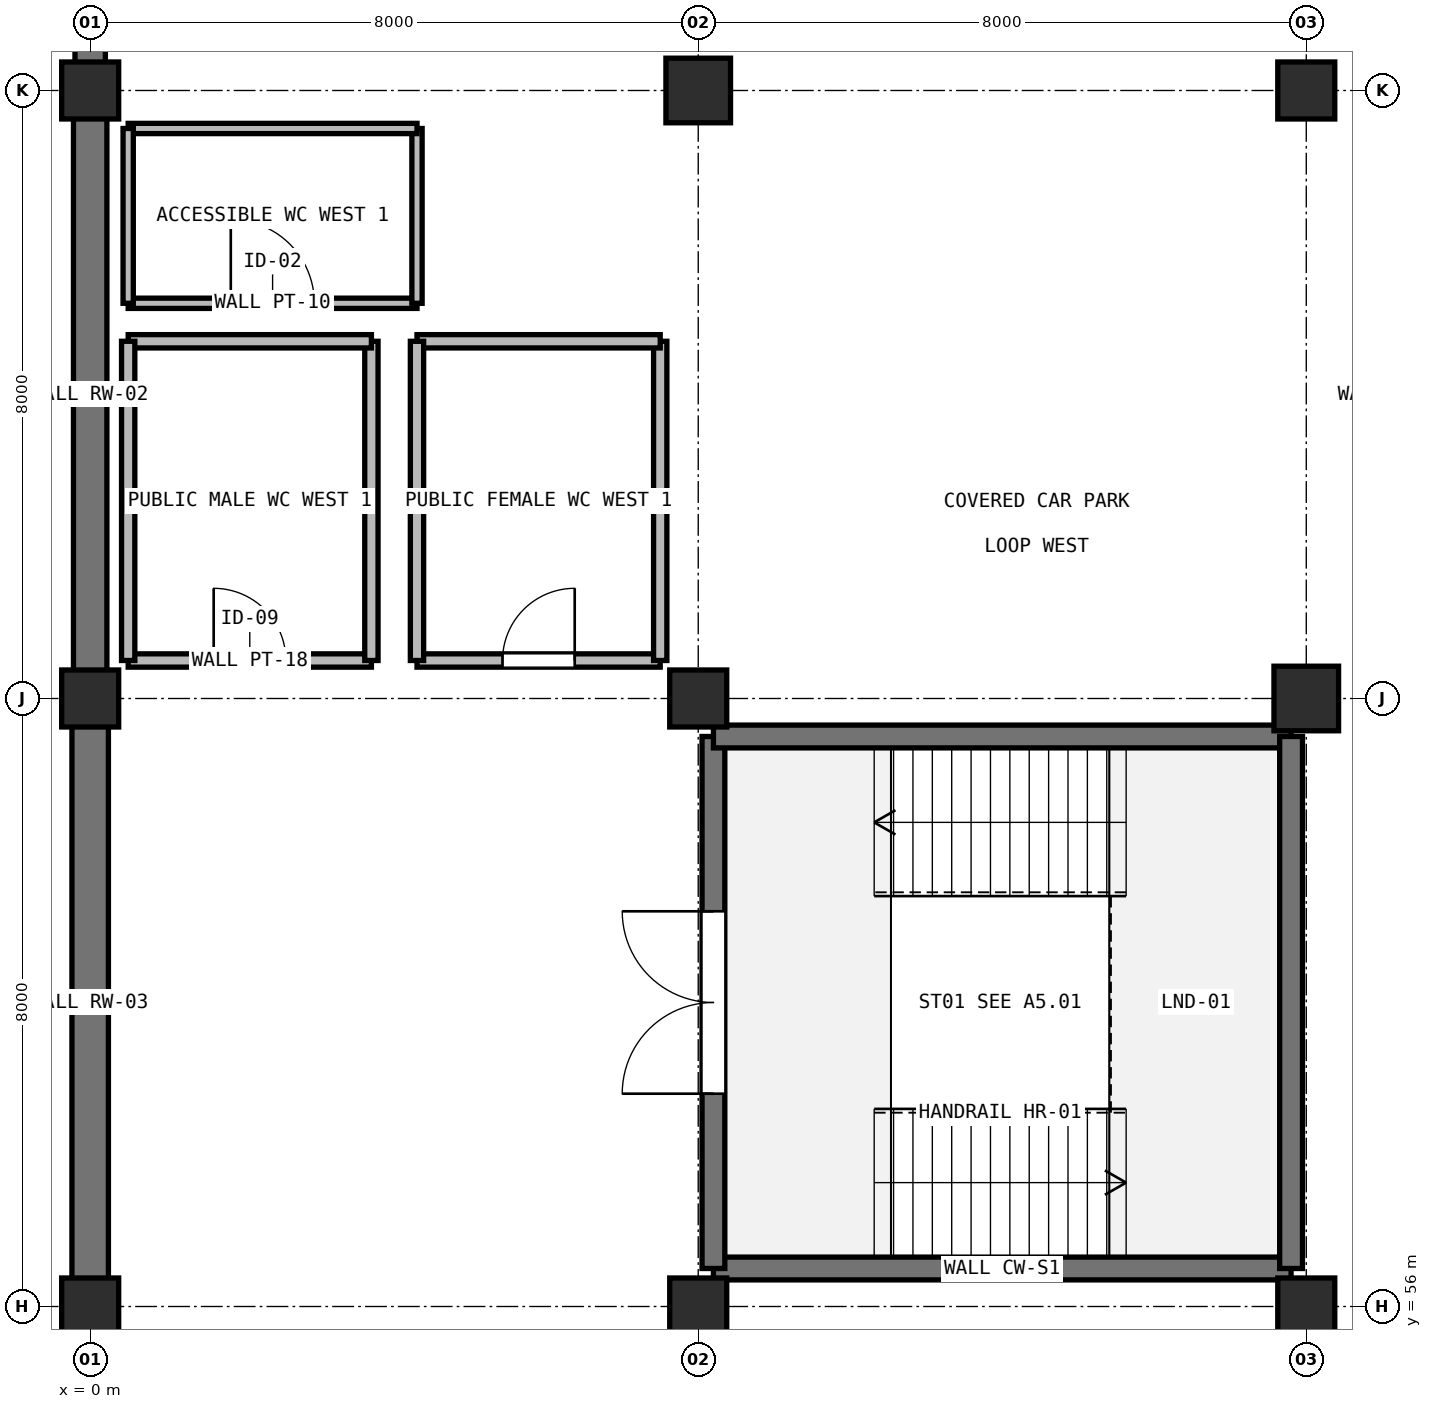
"""IFC4 building model, lengths in metres.
Left out: names, types, materials, properties, quantities, classifications, styles, units other than length and angle.
Written with IfcOpenShell. Run it as: python <this file> out.ifc"""

import sys

from ifc_helpers import new_model, si_unit, direction, frame, frame_2d, origin, origin_2d, place, context, subcontext, project, spatial, rectangle, extrude, element, fill, save


model = new_model("IFC4")
c1 = context("Model", 3, precision=1e-05, world=origin(), true_north=direction((0.0, 1.0)))
c2 = subcontext(c1, "Body", "Model", "MODEL_VIEW")
j1 = project(units=[si_unit("LENGTHUNIT", "METRE"), si_unit("PLANEANGLEUNIT", "RADIAN")], contexts=[c1])
p1 = place(None, origin())
s1 = spatial("IfcSite", under=j1, at=p1, CompositionType="ELEMENT")
p2 = place(p1, origin())
s2 = spatial("IfcBuilding", under=s1, at=p2, CompositionType="ELEMENT")
p3 = place(p2, frame((0.0, 0.0, -4.8)))
s3 = spatial("IfcBuildingStorey", under=s2, at=p3, CompositionType="ELEMENT", Elevation=-4.8)
for number, where, z_axis, x_axis in (
    (1, (0.0, 56.0, 0.0), (0.0, 0.0, 1.0), (1.0, 0.0, 0.0)),
    (2, (0.0, 64.0, 0.0), (0.0, 0.0, 1.0), (1.0, 0.0, 0.0)),
    (3, (0.0, 72.0, 0.0), (0.0, 0.0, 1.0), (1.0, 0.0, 0.0)),
    (4, (8.0, 56.0, 0.0), (0.0, 0.0, 1.0), (1.0, 0.0, 0.0)),
    (5, (8.0, 64.0, 0.0), (0.0, 0.0, 1.0), (1.0, 0.0, 0.0)),
):
    element("IfcColumn", number, at=place(p3, frame(where, z_axis=z_axis, x_axis=x_axis)), inside=s3, PredefinedType="COLUMN", context=c2, shape_type="SweptSolid", body=[
        extrude(rectangle(XDim=0.75, YDim=0.75, at=origin_2d()), origin(), (0.0, 0.0, 1.0), 4.8),
    ])
p4 = place(p3, frame((8.0, 72.0, 0.0), z_axis=(0.0, 0.0, 1.0), x_axis=(1.0, 0.0, 0.0)))
e6 = element("IfcColumn", 6, at=p4, inside=s3, PredefinedType="COLUMN", context=c2, shape_type="SweptSolid", body=[
    extrude(rectangle(XDim=0.85, YDim=0.85, at=origin_2d()), origin(), (0.0, 0.0, 1.0), 4.8),
])
p5 = place(p3, frame((16.0, 56.0, 0.0), z_axis=(0.0, 0.0, 1.0), x_axis=(1.0, 0.0, 0.0)))
e7 = element("IfcColumn", 7, at=p5, inside=s3, PredefinedType="COLUMN", context=c2, shape_type="SweptSolid", body=[
    extrude(rectangle(XDim=0.75, YDim=0.75, at=origin_2d()), origin(), (0.0, 0.0, 1.0), 4.8),
])
p6 = place(p3, frame((16.0, 64.0, 0.0), z_axis=(0.0, 0.0, 1.0), x_axis=(1.0, 0.0, 0.0)))
e8 = element("IfcColumn", 8, at=p6, inside=s3, PredefinedType="COLUMN", context=c2, shape_type="SweptSolid", body=[
    extrude(rectangle(XDim=0.85, YDim=0.85, at=origin_2d()), origin(), (0.0, 0.0, 1.0), 4.8),
])
p7 = place(p3, frame((16.0, 72.0, 0.0), z_axis=(0.0, 0.0, 1.0), x_axis=(1.0, 0.0, 0.0)))
e9 = element("IfcColumn", 9, at=p7, inside=s3, PredefinedType="COLUMN", context=c2, shape_type="SweptSolid", body=[
    extrude(rectangle(XDim=0.75, YDim=0.75, at=origin_2d()), origin(), (0.0, 0.0, 1.0), 4.8),
])
p8 = place(p3, frame((0.0, 72.355, 0.0), z_axis=(0.0, 0.0, 1.0), x_axis=(0.0, 1.0, 0.0)))
e10 = element("IfcWall", 10, at=p8, inside=s3, PredefinedType="USERDEFINED", context=c2, shape_type="SweptSolid", body=[
    extrude(rectangle(XDim=7.24, YDim=0.4, at=frame_2d((3.62, 0.0))), origin(), (0.0, 0.0, 1.0), 4.46),
])
p9 = place(p3, frame((0.0, 64.355, 0.0), z_axis=(0.0, 0.0, 1.0), x_axis=(0.0, 1.0, 0.0)))
e11 = element("IfcWall", 11, at=p9, inside=s3, PredefinedType="USERDEFINED", context=c2, shape_type="SweptSolid", body=[
    extrude(rectangle(XDim=7.29, YDim=0.44, at=frame_2d((3.645, 0.0))), origin(), (0.0, 0.0, 1.0), 4.46),
])
p10 = place(p3, frame((0.0, 56.355, 0.0), z_axis=(0.0, 0.0, 1.0), x_axis=(0.0, 1.0, 0.0)))
e12 = element("IfcWall", 12, at=p10, inside=s3, PredefinedType="USERDEFINED", context=c2, shape_type="SweptSolid", body=[
    extrude(rectangle(XDim=7.29, YDim=0.48, at=frame_2d((3.645, 0.0))), origin(), (0.0, 0.0, 1.0), 4.46),
])
p11 = place(p3, frame((15.8, 56.5, 0.0), z_axis=(0.0, 0.0, 1.0), x_axis=(-1.0, 0.0, 0.0)))
e13 = element("IfcWall", 13, at=p11, inside=s3, PredefinedType="SHEAR", context=c2, shape_type="SweptSolid", body=[
    extrude(rectangle(XDim=7.6, YDim=0.3, at=frame_2d((3.8, 0.0))), origin(), (0.0, 0.0, 1.0), 4.46),
])
p12 = place(p3, frame((8.2, 56.5, 0.0), z_axis=(0.0, 0.0, 1.0), x_axis=(0.0, 1.0, 0.0)))
e14 = element("IfcWall", 14, at=p12, inside=s3, PredefinedType="SHEAR", context=c2, shape_type="SweptSolid", body=[
    extrude(rectangle(XDim=7.0, YDim=0.3, at=frame_2d((3.5, 0.0))), origin(), (0.0, 0.0, 1.0), 4.46),
])
p13 = place(p12, frame((2.3, 0.0, 0.0)))
e15 = element("IfcOpeningElement", 15, at=p13, cuts=e14, PredefinedType="OPENING", context=c2, shape_type="SweptSolid", body=[
    extrude(rectangle(XDim=2.4, YDim=2.2, at=frame_2d((1.2, 1.1))), frame((0.0, 0.16, 0.0), z_axis=(0.0, -1.0, 0.0), x_axis=(1.0, 0.0, 0.0)), (0.0, 0.0, 1.0), 0.32),
])
p14 = place(p3, frame((8.2, 63.5, 0.0), z_axis=(0.0, 0.0, 1.0), x_axis=(1.0, 0.0, 0.0)))
e16 = element("IfcWall", 16, at=p14, inside=s3, PredefinedType="SHEAR", context=c2, shape_type="SweptSolid", body=[
    extrude(rectangle(XDim=7.6, YDim=0.3, at=frame_2d((3.8, 0.0))), origin(), (0.0, 0.0, 1.0), 4.46),
])
p15 = place(p3, frame((15.8, 63.5, 0.0), z_axis=(0.0, 0.0, 1.0), x_axis=(0.0, -1.0, 0.0)))
e17 = element("IfcWall", 17, at=p15, inside=s3, PredefinedType="SHEAR", context=c2, shape_type="SweptSolid", body=[
    extrude(rectangle(XDim=7.0, YDim=0.3, at=frame_2d((3.5, 0.0))), origin(), (0.0, 0.0, 1.0), 4.46),
])
p16 = place(p3, frame((0.5, 64.5, 0.0), z_axis=(0.0, 0.0, 1.0), x_axis=(1.0, 0.0, 0.0)))
e18 = element("IfcWall", 18, at=p16, inside=s3, PredefinedType="PARTITIONING", context=c2, shape_type="SweptSolid", body=[
    extrude(rectangle(XDim=3.2, YDim=0.175, at=frame_2d((1.6, 0.0))), origin(), (0.0, 0.0, 1.0), 3.25),
])
p17 = place(p16, frame((1.125, 0.0, 0.0)))
e19 = element("IfcOpeningElement", 19, at=p17, cuts=e18, PredefinedType="OPENING", context=c2, shape_type="SweptSolid", body=[
    extrude(rectangle(XDim=0.95, YDim=2.15, at=frame_2d((0.475, 1.075))), frame((0.0, 0.098, 0.0), z_axis=(0.0, -1.0, 0.0), x_axis=(1.0, 0.0, 0.0)), (0.0, 0.0, 1.0), 0.195),
])
p18 = place(p3, frame((3.7, 64.5, 0.0), z_axis=(0.0, 0.0, 1.0), x_axis=(0.0, 1.0, 0.0)))
e20 = element("IfcWall", 20, at=p18, inside=s3, PredefinedType="PARTITIONING", context=c2, shape_type="SweptSolid", body=[
    extrude(rectangle(XDim=4.2, YDim=0.175, at=frame_2d((2.1, 0.0))), origin(), (0.0, 0.0, 1.0), 4.46),
])
p19 = place(p3, frame((3.7, 68.7, 0.0), z_axis=(0.0, 0.0, 1.0), x_axis=(-1.0, 0.0, 0.0)))
e21 = element("IfcWall", 21, at=p19, inside=s3, PredefinedType="PARTITIONING", context=c2, shape_type="SweptSolid", body=[
    extrude(rectangle(XDim=3.2, YDim=0.175, at=frame_2d((1.6, 0.0))), origin(), (0.0, 0.0, 1.0), 4.0),
])
p20 = place(p3, frame((0.5, 68.7, 0.0), z_axis=(0.0, 0.0, 1.0), x_axis=(0.0, -1.0, 0.0)))
e22 = element("IfcWall", 22, at=p20, inside=s3, PredefinedType="PARTITIONING", context=c2, shape_type="SweptSolid", body=[
    extrude(rectangle(XDim=4.2, YDim=0.175, at=frame_2d((2.1, 0.0))), origin(), (0.0, 0.0, 1.0), 3.6),
])
p21 = place(p3, frame((4.3, 64.5, 0.0), z_axis=(0.0, 0.0, 1.0), x_axis=(1.0, 0.0, 0.0)))
e23 = element("IfcWall", 23, at=p21, inside=s3, PredefinedType="PARTITIONING", context=c2, shape_type="SweptSolid", body=[
    extrude(rectangle(XDim=3.2, YDim=0.175, at=frame_2d((1.6, 0.0))), origin(), (0.0, 0.0, 1.0), 3.25),
])
p22 = place(p21, frame((1.125, 0.0, 0.0)))
e24 = element("IfcOpeningElement", 24, at=p22, cuts=e23, PredefinedType="OPENING", context=c2, shape_type="SweptSolid", body=[
    extrude(rectangle(XDim=0.95, YDim=2.15, at=frame_2d((0.475, 1.075))), frame((0.0, 0.098, 0.0), z_axis=(0.0, -1.0, 0.0), x_axis=(1.0, 0.0, 0.0)), (0.0, 0.0, 1.0), 0.195),
])
p23 = place(p3, frame((7.5, 64.5, 0.0), z_axis=(0.0, 0.0, 1.0), x_axis=(0.0, 1.0, 0.0)))
e25 = element("IfcWall", 25, at=p23, inside=s3, PredefinedType="PARTITIONING", context=c2, shape_type="SweptSolid", body=[
    extrude(rectangle(XDim=4.2, YDim=0.175, at=frame_2d((2.1, 0.0))), origin(), (0.0, 0.0, 1.0), 3.45),
])
p24 = place(p3, frame((7.5, 68.7, 0.0), z_axis=(0.0, 0.0, 1.0), x_axis=(-1.0, 0.0, 0.0)))
e26 = element("IfcWall", 26, at=p24, inside=s3, PredefinedType="PARTITIONING", context=c2, shape_type="SweptSolid", body=[
    extrude(rectangle(XDim=3.2, YDim=0.175, at=frame_2d((1.6, 0.0))), origin(), (0.0, 0.0, 1.0), 4.0),
])
p25 = place(p3, frame((4.3, 68.7, 0.0), z_axis=(0.0, 0.0, 1.0), x_axis=(0.0, -1.0, 0.0)))
e27 = element("IfcWall", 27, at=p25, inside=s3, PredefinedType="PARTITIONING", context=c2, shape_type="SweptSolid", body=[
    extrude(rectangle(XDim=4.2, YDim=0.175, at=frame_2d((2.1, 0.0))), origin(), (0.0, 0.0, 1.0), 4.46),
])
p26 = place(p3, frame((0.5, 69.2, 0.0), z_axis=(0.0, 0.0, 1.0), x_axis=(1.0, 0.0, 0.0)))
e28 = element("IfcWall", 28, at=p26, inside=s3, PredefinedType="PARTITIONING", context=c2, shape_type="SweptSolid", body=[
    extrude(rectangle(XDim=3.8, YDim=0.135, at=frame_2d((1.9, 0.0))), origin(), (0.0, 0.0, 1.0), 4.46),
])
p27 = place(p26, frame((1.35, 0.0, 0.0)))
e29 = element("IfcOpeningElement", 29, at=p27, cuts=e28, PredefinedType="OPENING", context=c2, shape_type="SweptSolid", body=[
    extrude(rectangle(XDim=1.1, YDim=2.15, at=frame_2d((0.55, 1.075))), frame((0.0, 0.078, 0.0), z_axis=(0.0, -1.0, 0.0), x_axis=(1.0, 0.0, 0.0)), (0.0, 0.0, 1.0), 0.155),
])
p28 = place(p3, frame((4.3, 69.2, 0.0), z_axis=(0.0, 0.0, 1.0), x_axis=(0.0, 1.0, 0.0)))
e30 = element("IfcWall", 30, at=p28, inside=s3, PredefinedType="PARTITIONING", context=c2, shape_type="SweptSolid", body=[
    extrude(rectangle(XDim=2.3, YDim=0.135, at=frame_2d((1.15, 0.0))), origin(), (0.0, 0.0, 1.0), 4.46),
])
p29 = place(p3, frame((4.3, 71.5, 0.0), z_axis=(0.0, 0.0, 1.0), x_axis=(-1.0, 0.0, 0.0)))
e31 = element("IfcWall", 31, at=p29, inside=s3, PredefinedType="PARTITIONING", context=c2, shape_type="SweptSolid", body=[
    extrude(rectangle(XDim=3.8, YDim=0.135, at=frame_2d((1.9, 0.0))), origin(), (0.0, 0.0, 1.0), 3.25),
])
p30 = place(p3, frame((0.5, 71.5, 0.0), z_axis=(0.0, 0.0, 1.0), x_axis=(0.0, -1.0, 0.0)))
e32 = element("IfcWall", 32, at=p30, inside=s3, PredefinedType="PARTITIONING", context=c2, shape_type="SweptSolid", body=[
    extrude(rectangle(XDim=2.3, YDim=0.135, at=frame_2d((1.15, 0.0))), origin(), (0.0, 0.0, 1.0), 3.6),
])
p31 = place(p13, frame((2.4, 0.0, 0.0), z_axis=(0.0, 0.0, 1.0), x_axis=(-1.0, 0.0, 0.0)))
e33 = element("IfcDoor", 33, at=p31, inside=s3, OperationType="DOUBLE_DOOR_SINGLE_SWING", PredefinedType="DOOR", context=c2, shape_type="SweptSolid", body=[
    extrude(rectangle(XDim=2.4, YDim=2.2, at=frame_2d((1.2, 1.1))), frame((0.0, 0.025, 0.0), z_axis=(0.0, -1.0, 0.0), x_axis=(1.0, 0.0, 0.0)), (0.0, 0.0, 1.0), 0.05),
])
fill(e15, e33)
p32 = place(p17, origin())
e34 = element("IfcDoor", 34, at=p32, inside=s3, OperationType="SINGLE_SWING_LEFT", PredefinedType="DOOR", context=c2, shape_type="SweptSolid", body=[
    extrude(rectangle(XDim=0.95, YDim=2.15, at=frame_2d((0.475, 1.075))), frame((0.0, 0.025, 0.0), z_axis=(0.0, -1.0, 0.0), x_axis=(1.0, 0.0, 0.0)), (0.0, 0.0, 1.0), 0.05),
])
fill(e19, e34)
p33 = place(p22, origin())
e35 = element("IfcDoor", 35, at=p33, inside=s3, OperationType="SINGLE_SWING_RIGHT", PredefinedType="DOOR", context=c2, shape_type="SweptSolid", body=[
    extrude(rectangle(XDim=0.95, YDim=2.15, at=frame_2d((0.475, 1.075))), frame((0.0, 0.025, 0.0), z_axis=(0.0, -1.0, 0.0), x_axis=(1.0, 0.0, 0.0)), (0.0, 0.0, 1.0), 0.05),
])
fill(e24, e35)
p34 = place(p27, origin())
e36 = element("IfcDoor", 36, at=p34, inside=s3, OperationType="SINGLE_SWING_LEFT", PredefinedType="DOOR", context=c2, shape_type="SweptSolid", body=[
    extrude(rectangle(XDim=1.1, YDim=2.15, at=frame_2d((0.55, 1.075))), frame((0.0, 0.025, 0.0), z_axis=(0.0, -1.0, 0.0), x_axis=(1.0, 0.0, 0.0)), (0.0, 0.0, 1.0), 0.05),
])
fill(e29, e36)
save(model, sys.argv[1])
